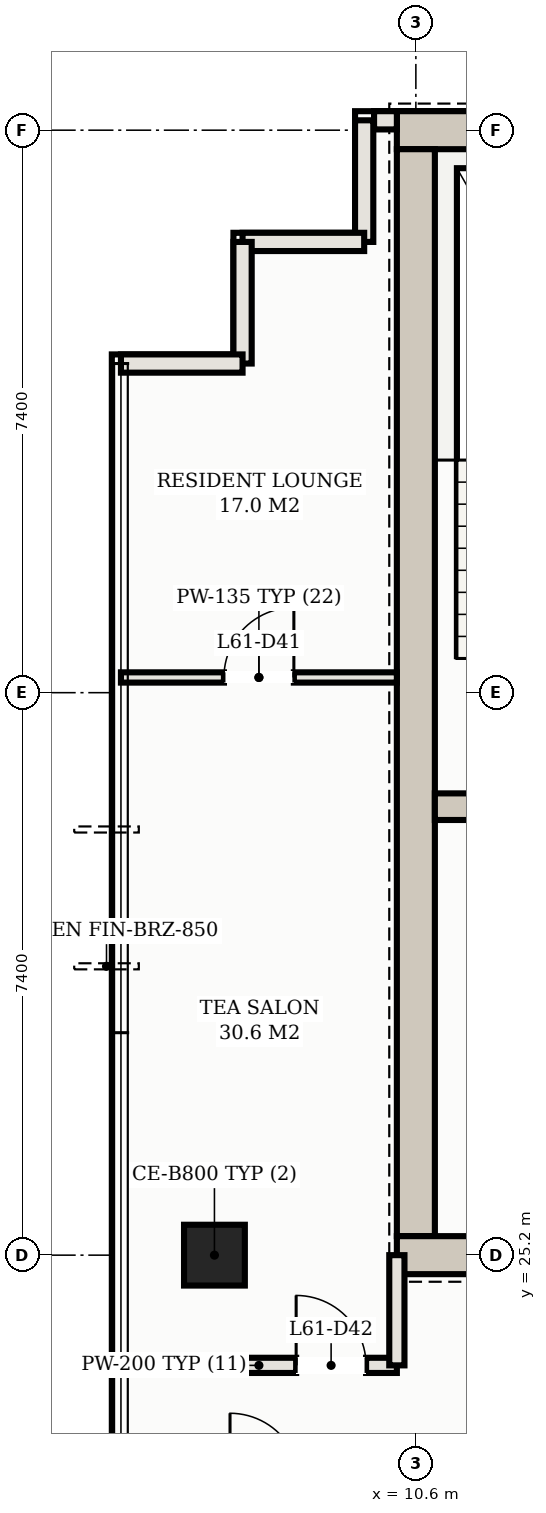
"""IFC4 building model, lengths in metres.
Left out: names, types, materials, properties, quantities, classifications, styles, units other than length and angle.
Written with IfcOpenShell. Run it as: python <this file> out.ifc"""

import sys

from ifc_helpers import new_model, si_unit, direction, frame, frame_2d, origin, origin_2d, place, context, subcontext, project, spatial, rectangle, hollow_rectangle, extrude, element, fill, save


model = new_model("IFC4")
c1 = context("Model", 3, precision=1e-05, world=origin(), true_north=direction((0.0, 1.0)))
c2 = subcontext(c1, "Body", "Model", "MODEL_VIEW")
j1 = project(units=[si_unit("LENGTHUNIT", "METRE"), si_unit("PLANEANGLEUNIT", "RADIAN")], contexts=[c1])
p1 = place(None, origin())
s1 = spatial("IfcSite", under=j1, at=p1, CompositionType="ELEMENT")
p2 = place(p1, origin())
s2 = spatial("IfcBuilding", under=s1, at=p2, CompositionType="ELEMENT")
p3 = place(p2, frame((0.0, 0.0, 223.1)))
s3 = spatial("IfcBuildingStorey", under=s2, at=p3, CompositionType="ELEMENT", Elevation=223.1)
p4 = place(p3, frame((10.35, 40.0, 0.0), z_axis=(0.0, 0.0, 1.0), x_axis=(1.0, 0.0, 0.0)))
e1 = element("IfcWall", 1, at=p4, inside=s3, PredefinedType="SHEAR", context=c2, shape_type="SweptSolid", body=[
    extrude(rectangle(XDim=32.3, YDim=0.5, at=frame_2d((16.15, 0.0))), origin(), (0.0, 0.0, 1.0), 3.11),
])
p5 = place(p3, frame((10.6, 25.45, 0.0), z_axis=(0.0, 0.0, 1.0), x_axis=(0.0, 1.0, 0.0)))
e2 = element("IfcWall", 2, at=p5, inside=s3, PredefinedType="SHEAR", context=c2, shape_type="SweptSolid", body=[
    extrude(rectangle(XDim=14.3, YDim=0.5, at=frame_2d((7.15, 0.0))), origin(), (0.0, 0.0, 1.0), 3.11),
])
p6 = place(p3, frame((10.35, 25.2, 0.0), z_axis=(0.0, 0.0, 1.0), x_axis=(1.0, 0.0, 0.0)))
e3 = element("IfcWall", 3, at=p6, inside=s3, PredefinedType="SHEAR", context=c2, shape_type="SweptSolid", body=[
    extrude(rectangle(XDim=8.05, YDim=0.5, at=frame_2d((4.025, 0.0))), origin(), (0.0, 0.0, 1.0), 3.11),
])
p7 = place(p6, frame((6.15, 0.0, 0.0)))
e4 = element("IfcOpeningElement", 4, at=p7, cuts=e3, PredefinedType="OPENING", context=c2, shape_type="SweptSolid", body=[
    extrude(rectangle(XDim=1.25, YDim=2.2, at=frame_2d((0.625, 1.1))), frame((0.0, 0.26, 0.0), z_axis=(0.0, -1.0, 0.0), x_axis=(1.0, 0.0, 0.0)), (0.0, 0.0, 1.0), 0.52),
])
p8 = place(p3, frame((10.85, 31.1, 0.0), z_axis=(0.0, 0.0, 1.0), x_axis=(1.0, 0.0, 0.0)))
e5 = element("IfcWall", 5, at=p8, inside=s3, PredefinedType="SHEAR", context=c2, shape_type="SweptSolid", body=[
    extrude(rectangle(XDim=4.075, YDim=0.35, at=frame_2d((2.038, 0.0))), origin(), (0.0, 0.0, 1.0), 3.11),
])
p9 = place(p3, frame((7.95, 25.2, 0.0), z_axis=(0.0, 0.0, 1.0), x_axis=(1.0, 0.0, 0.0)))
e6 = element("IfcColumn", 6, at=p9, inside=s3, PredefinedType="COLUMN", context=c2, shape_type="SweptSolid", body=[
    extrude(hollow_rectangle(XDim=0.8, YDim=0.8, WallThickness=0.028, at=origin_2d()), origin(), (0.0, 0.0, 1.0), 3.3),
])
p10 = place(p3, frame((10.35, 40.13, 0.0), z_axis=(0.0, 0.0, 1.0), x_axis=(-1.0, 0.0, 0.0)))
e7 = element("IfcWall", 7, at=p10, inside=s3, PredefinedType="SOLIDWALL", context=c2, shape_type="SweptSolid", body=[
    extrude(rectangle(XDim=0.3, YDim=0.24, at=frame_2d((0.15, 0.0))), origin(), (0.0, 0.0, 1.0), 3.11),
])
for number, where, z_axis, x_axis in (
    (8, (9.92, 40.13, 0.0), (0.0, 0.0, 1.0), (0.0, -1.0, 0.0)),
    (9, (9.92, 38.53, 0.0), (0.0, 0.0, 1.0), (-1.0, 0.0, 0.0)),
):
    element("IfcWall", number, at=place(p3, frame(where, z_axis=z_axis, x_axis=x_axis)), inside=s3, PredefinedType="SOLIDWALL", context=c2, shape_type="SweptSolid", body=[
        extrude(rectangle(XDim=1.6, YDim=0.24, at=frame_2d((0.8, 0.0))), origin(), (0.0, 0.0, 1.0), 3.11),
    ])
for number, where, z_axis, x_axis in (
    (10, (8.32, 38.53, 0.0), (0.0, 0.0, 1.0), (0.0, -1.0, 0.0)),
    (11, (8.32, 36.93, 0.0), (0.0, 0.0, 1.0), (-1.0, 0.0, 0.0)),
):
    element("IfcWall", number, at=place(p3, frame(where, z_axis=z_axis, x_axis=x_axis)), inside=s3, PredefinedType="SOLIDWALL", context=c2, shape_type="SweptSolid", body=[
        extrude(rectangle(XDim=1.6, YDim=0.24, at=frame_2d((0.8, 0.0))), origin(), (0.0, 0.0, 1.0), 3.11),
    ])
p11 = place(p3, frame((6.72, 23.75, 0.0), z_axis=(0.0, 0.0, 1.0), x_axis=(1.0, 0.0, 0.0)))
e12 = element("IfcWall", 12, at=p11, inside=s3, PredefinedType="PARTITIONING", context=c2, shape_type="SweptSolid", body=[
    extrude(rectangle(XDim=3.63, YDim=0.2, at=frame_2d((1.815, 0.0))), origin(), (0.0, 0.0, 1.0), 2.43),
])
p12 = place(p11, frame((2.305, 0.0, 0.0)))
e13 = element("IfcOpeningElement", 13, at=p12, cuts=e12, PredefinedType="OPENING", context=c2, shape_type="SweptSolid", body=[
    extrude(rectangle(XDim=0.92, YDim=2.15, at=frame_2d((0.46, 1.075))), frame((0.0, 0.11, 0.0), z_axis=(0.0, -1.0, 0.0), x_axis=(1.0, 0.0, 0.0)), (0.0, 0.0, 1.0), 0.22),
])
p13 = place(p3, frame((10.35, 23.75, 0.0), z_axis=(0.0, 0.0, 1.0), x_axis=(0.0, 1.0, 0.0)))
e14 = element("IfcWall", 14, at=p13, inside=s3, PredefinedType="PARTITIONING", context=c2, shape_type="SweptSolid", body=[
    extrude(rectangle(XDim=1.45, YDim=0.2, at=frame_2d((0.725, 0.0))), origin(), (0.0, 0.0, 1.0), 2.43),
])
p14 = place(p3, frame((6.72, 32.8, 0.0), z_axis=(0.0, 0.0, 1.0), x_axis=(1.0, 0.0, 0.0)))
e15 = element("IfcWall", 15, at=p14, inside=s3, PredefinedType="PARTITIONING", context=c2, shape_type="SweptSolid", body=[
    extrude(rectangle(XDim=3.63, YDim=0.135, at=frame_2d((1.815, 0.0))), origin(), (0.0, 0.0, 1.0), 2.43),
])
p15 = place(p14, frame((1.355, 0.0, 0.0)))
e16 = element("IfcOpeningElement", 16, at=p15, cuts=e15, PredefinedType="OPENING", context=c2, shape_type="SweptSolid", body=[
    extrude(rectangle(XDim=0.92, YDim=2.15, at=frame_2d((0.46, 1.075))), frame((0.0, 0.078, 0.0), z_axis=(0.0, -1.0, 0.0), x_axis=(1.0, 0.0, 0.0)), (0.0, 0.0, 1.0), 0.155),
])
p16 = place(p15, origin())
e17 = element("IfcDoor", 17, at=p16, inside=s3, OperationType="SINGLE_SWING_RIGHT", PredefinedType="DOOR", context=c2, shape_type="SweptSolid", body=[
    extrude(rectangle(XDim=0.92, YDim=2.15, at=frame_2d((0.46, 1.075))), frame((0.0, 0.025, 0.0), z_axis=(0.0, -1.0, 0.0), x_axis=(1.0, 0.0, 0.0)), (0.0, 0.0, 1.0), 0.05),
])
fill(e16, e17)
p17 = place(p12, origin())
e18 = element("IfcDoor", 18, at=p17, inside=s3, OperationType="SINGLE_SWING_LEFT", PredefinedType="DOOR", context=c2, shape_type="SweptSolid", body=[
    extrude(rectangle(XDim=0.92, YDim=2.15, at=frame_2d((0.46, 1.075))), frame((0.0, 0.025, 0.0), z_axis=(0.0, -1.0, 0.0), x_axis=(1.0, 0.0, 0.0)), (0.0, 0.0, 1.0), 0.05),
])
fill(e13, e18)
save(model, sys.argv[1])
